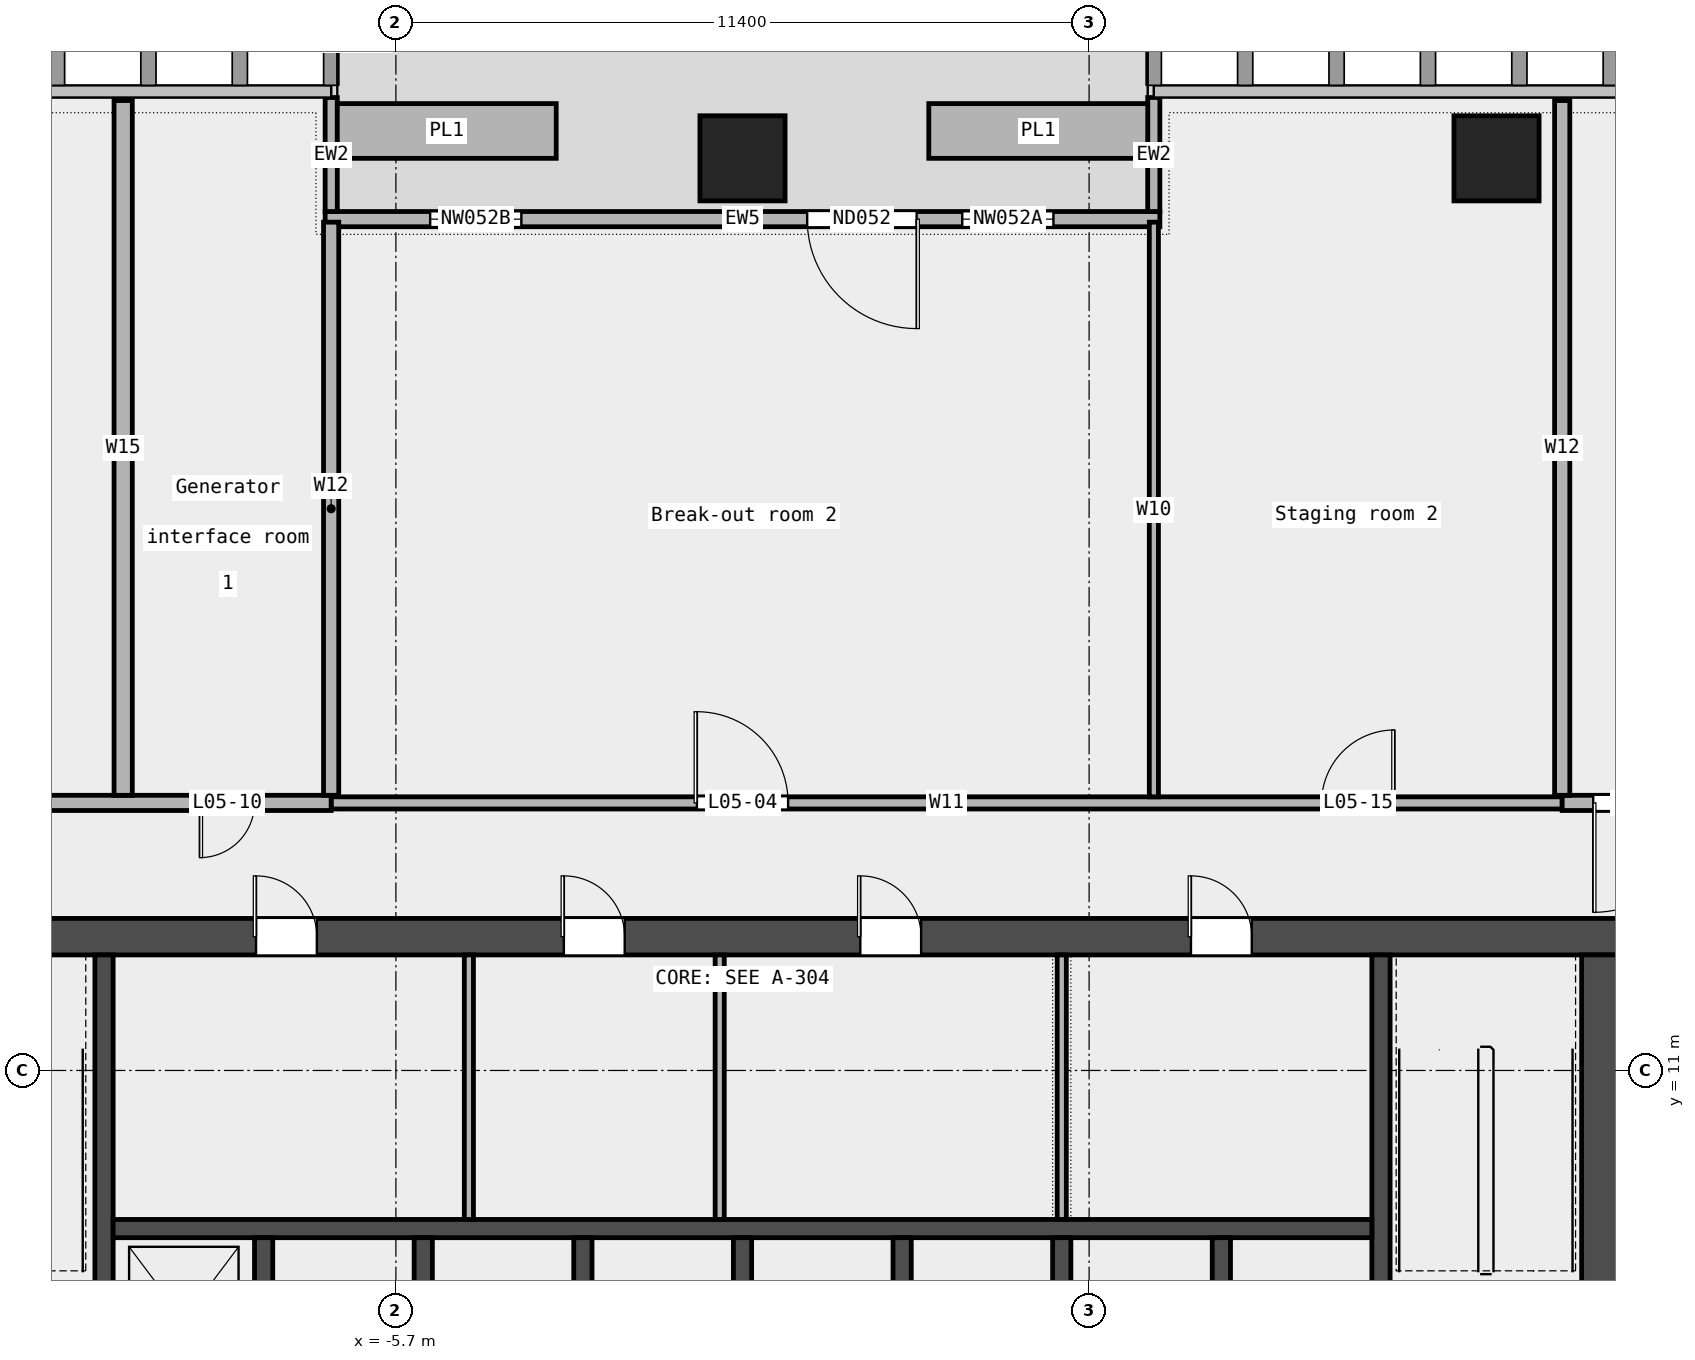
"""IFC4 building model, lengths in metres.
Left out: names, types, materials, properties, quantities, classifications, styles, units other than length and angle.
Written with IfcOpenShell. Run it as: python <this file> out.ifc"""

import sys

from ifc_helpers import new_model, si_unit, direction, frame, frame_2d, origin, origin_2d, place, context, subcontext, project, spatial, rectangle, extrude, element, fill, save


model = new_model("IFC4")
c1 = context("Model", 3, precision=1e-05, world=origin(), true_north=direction((0.0, 1.0)))
c2 = subcontext(c1, "Body", "Model", "MODEL_VIEW")
j1 = project(units=[si_unit("LENGTHUNIT", "METRE"), si_unit("PLANEANGLEUNIT", "RADIAN")], contexts=[c1])
p1 = place(None, origin())
s1 = spatial("IfcSite", under=j1, at=p1, CompositionType="ELEMENT")
p2 = place(p1, origin())
s2 = spatial("IfcBuilding", under=s1, at=p2, CompositionType="ELEMENT")
p3 = place(p2, frame((0.0, 0.0, 31.0)))
s3 = spatial("IfcBuildingStorey", under=s2, at=p3, CompositionType="ELEMENT", Elevation=31.0)
for number, where, z_axis, x_axis in (
    (1, (12.4, 26.0, 0.0), (0.0, 0.0, 1.0), (1.0, 0.0, 0.0)),
    (2, (0.0, 26.0, 0.0), (0.0, 0.0, 1.0), (1.0, 0.0, 0.0)),
):
    element("IfcColumn", number, at=place(p3, frame(where, z_axis=z_axis, x_axis=x_axis)), inside=s3, PredefinedType="COLUMN", context=c2, shape_type="SweptSolid", body=[
        extrude(rectangle(XDim=1.4, YDim=1.4, at=origin_2d()), origin(), (0.0, 0.0, 1.0), 4.35),
    ])
p4 = place(p3, frame((6.864, 25.0, 0.0), z_axis=(0.0, 0.0, 1.0), x_axis=(-1.0, 0.0, 0.0)))
e3 = element("IfcWall", 3, at=p4, inside=s3, PredefinedType="STANDARD", context=c2, shape_type="SweptSolid", body=[
    extrude(rectangle(XDim=13.727, YDim=0.25, at=frame_2d((6.864, 0.0))), origin(), (0.0, 0.0, 1.0), 4.35),
])
p5 = place(p4, frame((1.75, 0.0, 0.45)))
e4 = element("IfcOpeningElement", 4, at=p5, cuts=e3, PredefinedType="OPENING", context=c2, shape_type="SweptSolid", body=[
    extrude(rectangle(XDim=1.5, YDim=3.0, at=frame_2d((0.75, 1.5))), frame((0.0, 0.137, 0.0), z_axis=(0.0, -1.0, 0.0), x_axis=(1.0, 0.0, 0.0)), (0.0, 0.0, 1.0), 0.274),
])
p6 = place(p4, frame((4.0, 0.0, 0.0)))
e5 = element("IfcOpeningElement", 5, at=p6, cuts=e3, PredefinedType="OPENING", context=c2, shape_type="SweptSolid", body=[
    extrude(rectangle(XDim=1.8, YDim=2.4, at=frame_2d((0.9, 1.2))), frame((0.0, 0.137, 0.0), z_axis=(0.0, -1.0, 0.0), x_axis=(1.0, 0.0, 0.0)), (0.0, 0.0, 1.0), 0.274),
])
p7 = place(p4, frame((10.5, 0.0, 0.45)))
e6 = element("IfcOpeningElement", 6, at=p7, cuts=e3, PredefinedType="OPENING", context=c2, shape_type="SweptSolid", body=[
    extrude(rectangle(XDim=1.5, YDim=3.0, at=frame_2d((0.75, 1.5))), frame((0.0, 0.137, 0.0), z_axis=(0.0, -1.0, 0.0), x_axis=(1.0, 0.0, 0.0)), (0.0, 0.0, 1.0), 0.274),
])
for number, where, z_axis, x_axis in (
    (7, (6.764, 27.0, 0.0), (0.0, 0.0, 1.0), (0.0, -1.0, 0.0)),
    (8, (-6.764, 27.0, 0.0), (0.0, 0.0, 1.0), (0.0, -1.0, 0.0)),
):
    element("IfcWall", number, at=place(p3, frame(where, z_axis=z_axis, x_axis=x_axis)), inside=s3, PredefinedType="STANDARD", context=c2, shape_type="SweptSolid", body=[
        extrude(rectangle(XDim=1.875, YDim=0.2, at=frame_2d((0.938, 0.0))), origin(), (0.0, 0.0, 1.0), 4.35),
    ])
for number, where, z_axis, x_axis in (
    (9, (6.664, 26.45, 0.0), (0.0, 0.0, 1.0), (-1.0, 0.0, 0.0)),
    (10, (-3.064, 26.45, 0.0), (0.0, 0.0, 1.0), (-1.0, 0.0, 0.0)),
):
    element("IfcWall", number, at=place(p3, frame(where, z_axis=z_axis, x_axis=x_axis)), inside=s3, PredefinedType="STANDARD", context=c2, shape_type="SweptSolid", body=[
        extrude(rectangle(XDim=3.6, YDim=0.9, at=frame_2d((1.8, 0.0))), origin(), (0.0, 0.0, 1.0), 0.7),
    ])
p8 = place(p3, frame((-6.765, 15.4, 0.0), z_axis=(0.0, 0.0, 1.0), x_axis=(1.0, 0.0, 0.0)))
e11 = element("IfcWall", 11, at=p8, inside=s3, PredefinedType="PARTITIONING", context=c2, shape_type="SweptSolid", body=[
    extrude(rectangle(XDim=20.245, YDim=0.2, at=frame_2d((10.123, 0.0))), origin(), (0.0, 0.0, 1.0), 4.35),
])
p9 = place(p8, frame((6.015, 0.0, 0.0)))
e12 = element("IfcOpeningElement", 12, at=p9, cuts=e11, PredefinedType="OPENING", context=c2, shape_type="SweptSolid", body=[
    extrude(rectangle(XDim=1.5, YDim=2.1, at=frame_2d((0.75, 1.05))), frame((0.0, 0.112, 0.0), z_axis=(0.0, -1.0, 0.0), x_axis=(1.0, 0.0, 0.0)), (0.0, 0.0, 1.0), 0.224),
])
p10 = place(p8, frame((16.288, 0.0, 0.0)))
e13 = element("IfcOpeningElement", 13, at=p10, cuts=e11, PredefinedType="OPENING", context=c2, shape_type="SweptSolid", body=[
    extrude(rectangle(XDim=1.2, YDim=2.1, at=frame_2d((0.6, 1.05))), frame((0.0, 0.112, 0.0), z_axis=(0.0, -1.0, 0.0), x_axis=(1.0, 0.0, 0.0)), (0.0, 0.0, 1.0), 0.224),
])
p11 = place(p3, frame((-21.7, 15.4, 0.0), z_axis=(0.0, 0.0, 1.0), x_axis=(1.0, 0.0, 0.0)))
e14 = element("IfcWall", 14, at=p11, inside=s3, PredefinedType="PARTITIONING", context=c2, shape_type="SweptSolid", body=[
    extrude(rectangle(XDim=14.935, YDim=0.25, at=frame_2d((7.468, 0.0))), origin(), (0.0, 0.0, 1.0), 4.35),
])
p12 = place(p11, frame((12.775, 0.0, 0.0)))
e15 = element("IfcOpeningElement", 15, at=p12, cuts=e14, PredefinedType="OPENING", context=c2, shape_type="SweptSolid", body=[
    extrude(rectangle(XDim=0.9, YDim=2.1, at=frame_2d((0.45, 1.05))), frame((0.0, 0.137, 0.0), z_axis=(0.0, -1.0, 0.0), x_axis=(1.0, 0.0, 0.0)), (0.0, 0.0, 1.0), 0.274),
])
p13 = place(p11, frame((7.558, 0.0, 0.0)))
e16 = element("IfcOpeningElement", 16, at=p13, cuts=e14, PredefinedType="OPENING", context=c2, shape_type="SweptSolid", body=[
    extrude(rectangle(XDim=1.8, YDim=2.1, at=frame_2d((0.9, 1.05))), frame((0.0, 0.137, 0.0), z_axis=(0.0, -1.0, 0.0), x_axis=(1.0, 0.0, 0.0)), (0.0, 0.0, 1.0), 0.274),
])
p14 = place(p3, frame((13.48, 15.4, 0.0), z_axis=(0.0, 0.0, 1.0), x_axis=(1.0, 0.0, 0.0)))
e17 = element("IfcWall", 17, at=p14, inside=s3, PredefinedType="PARTITIONING", context=c2, shape_type="SweptSolid", body=[
    extrude(rectangle(XDim=2.82, YDim=0.25, at=frame_2d((1.41, 0.0))), origin(), (0.0, 0.0, 1.0), 4.35),
])
p15 = place(p14, frame((0.51, 0.0, 0.0)))
e18 = element("IfcOpeningElement", 18, at=p15, cuts=e17, PredefinedType="OPENING", context=c2, shape_type="SweptSolid", body=[
    extrude(rectangle(XDim=1.8, YDim=2.1, at=frame_2d((0.9, 1.05))), frame((0.0, 0.137, 0.0), z_axis=(0.0, -1.0, 0.0), x_axis=(1.0, 0.0, 0.0)), (0.0, 0.0, 1.0), 0.274),
])
p16 = place(p3, frame((-10.185, 15.525, 0.0), z_axis=(0.0, 0.0, 1.0), x_axis=(0.0, 1.0, 0.0)))
e19 = element("IfcWall", 19, at=p16, inside=s3, PredefinedType="PARTITIONING", context=c2, shape_type="SweptSolid", body=[
    extrude(rectangle(XDim=11.425, YDim=0.3, at=frame_2d((5.712, 0.0))), origin(), (0.0, 0.0, 1.0), 4.35),
])
p17 = place(p3, frame((-6.765, 15.525, 0.0), z_axis=(0.0, 0.0, 1.0), x_axis=(0.0, 1.0, 0.0)))
e20 = element("IfcWall", 20, at=p17, inside=s3, PredefinedType="PARTITIONING", context=c2, shape_type="SweptSolid", body=[
    extrude(rectangle(XDim=9.425, YDim=0.25, at=frame_2d((4.712, 0.0))), origin(), (0.0, 0.0, 1.0), 4.35),
])
p18 = place(p3, frame((6.765, 15.5, 0.0), z_axis=(0.0, 0.0, 1.0), x_axis=(0.0, 1.0, 0.0)))
e21 = element("IfcWall", 21, at=p18, inside=s3, PredefinedType="PARTITIONING", context=c2, shape_type="SweptSolid", body=[
    extrude(rectangle(XDim=9.45, YDim=0.15, at=frame_2d((4.725, 0.0))), origin(), (0.0, 0.0, 1.0), 4.35),
])
p19 = place(p3, frame((13.48, 15.525, 0.0), z_axis=(0.0, 0.0, 1.0), x_axis=(0.0, 1.0, 0.0)))
e22 = element("IfcWall", 22, at=p19, inside=s3, PredefinedType="PARTITIONING", context=c2, shape_type="SweptSolid", body=[
    extrude(rectangle(XDim=11.425, YDim=0.25, at=frame_2d((5.712, 0.0))), origin(), (0.0, 0.0, 1.0), 4.35),
])
p20 = place(p3, frame((-14.4, 13.2, 0.0), z_axis=(0.0, 0.0, 1.0), x_axis=(1.0, 0.0, 0.0)))
e23 = element("IfcWall", 23, at=p20, inside=s3, PredefinedType="SHEAR", context=c2, shape_type="SweptSolid", body=[
    extrude(rectangle(XDim=28.8, YDim=0.6, at=frame_2d((14.4, 0.0))), origin(), (0.0, 0.0, 1.0), 4.5),
])
p21 = place(p20, frame((6.4, 0.0, 0.0)))
e24 = element("IfcOpeningElement", 24, at=p21, cuts=e23, PredefinedType="OPENING", context=c2, shape_type="SweptSolid", body=[
    extrude(rectangle(XDim=1.0, YDim=2.1, at=frame_2d((0.5, 1.05))), frame((0.0, 0.312, 0.0), z_axis=(0.0, -1.0, 0.0), x_axis=(1.0, 0.0, 0.0)), (0.0, 0.0, 1.0), 0.624),
])
p22 = place(p20, frame((11.462, 0.0, 0.0)))
e25 = element("IfcOpeningElement", 25, at=p22, cuts=e23, PredefinedType="OPENING", context=c2, shape_type="SweptSolid", body=[
    extrude(rectangle(XDim=1.0, YDim=2.1, at=frame_2d((0.5, 1.05))), frame((0.0, 0.312, 0.0), z_axis=(0.0, -1.0, 0.0), x_axis=(1.0, 0.0, 0.0)), (0.0, 0.0, 1.0), 0.624),
])
p23 = place(p20, frame((16.337, 0.0, 0.0)))
e26 = element("IfcOpeningElement", 26, at=p23, cuts=e23, PredefinedType="OPENING", context=c2, shape_type="SweptSolid", body=[
    extrude(rectangle(XDim=1.0, YDim=2.1, at=frame_2d((0.5, 1.05))), frame((0.0, 0.312, 0.0), z_axis=(0.0, -1.0, 0.0), x_axis=(1.0, 0.0, 0.0)), (0.0, 0.0, 1.0), 0.624),
])
p24 = place(p20, frame((21.775, 0.0, 0.0)))
e27 = element("IfcOpeningElement", 27, at=p24, cuts=e23, PredefinedType="OPENING", context=c2, shape_type="SweptSolid", body=[
    extrude(rectangle(XDim=1.0, YDim=2.1, at=frame_2d((0.5, 1.05))), frame((0.0, 0.312, 0.0), z_axis=(0.0, -1.0, 0.0), x_axis=(1.0, 0.0, 0.0)), (0.0, 0.0, 1.0), 0.624),
])
p25 = place(p3, frame((14.1, -6.6, 0.0), z_axis=(0.0, 0.0, 1.0), x_axis=(0.0, 1.0, 0.0)))
e28 = element("IfcWall", 28, at=p25, inside=s3, PredefinedType="SHEAR", context=c2, shape_type="SweptSolid", body=[
    extrude(rectangle(XDim=19.5, YDim=0.6, at=frame_2d((9.75, 0.0))), origin(), (0.0, 0.0, 1.0), 4.5),
])
p26 = place(p25, frame((9.3, 0.0, 0.0)))
e29 = element("IfcOpeningElement", 29, at=p26, cuts=e28, PredefinedType="OPENING", context=c2, shape_type="SweptSolid", body=[
    extrude(rectangle(XDim=1.8, YDim=2.1, at=frame_2d((0.9, 1.05))), frame((0.0, 0.312, 0.0), z_axis=(0.0, -1.0, 0.0), x_axis=(1.0, 0.0, 0.0)), (0.0, 0.0, 1.0), 0.624),
])
for number, where, z_axis, x_axis in (
    (30, (-10.5, 5.25, 0.0), (0.0, 0.0, 1.0), (0.0, 1.0, 0.0)),
    (31, (10.5, 5.25, 0.0), (0.0, 0.0, 1.0), (0.0, 1.0, 0.0)),
):
    element("IfcWall", number, at=place(p3, frame(where, z_axis=z_axis, x_axis=x_axis)), inside=s3, PredefinedType="SHEAR", context=c2, shape_type="SweptSolid", body=[
        extrude(rectangle(XDim=7.65, YDim=0.3, at=frame_2d((3.825, 0.0))), origin(), (0.0, 0.0, 1.0), 4.5),
    ])
p27 = place(p3, frame((-10.35, 8.4, 0.0), z_axis=(0.0, 0.0, 1.0), x_axis=(1.0, 0.0, 0.0)))
e32 = element("IfcWall", 32, at=p27, inside=s3, PredefinedType="SOLIDWALL", context=c2, shape_type="SweptSolid", body=[
    extrude(rectangle(XDim=20.7, YDim=0.3, at=frame_2d((10.35, 0.0))), origin(), (0.0, 0.0, 1.0), 4.5),
])
for number, where, z_axis, x_axis in (
    (33, (-7.875, 5.55, 0.0), (0.0, 0.0, 1.0), (0.0, 1.0, 0.0)),
    (34, (-5.25, 5.55, 0.0), (0.0, 0.0, 1.0), (0.0, 1.0, 0.0)),
    (35, (-2.625, 5.55, 0.0), (0.0, 0.0, 1.0), (0.0, 1.0, 0.0)),
    (36, (0.0, 5.55, 0.0), (0.0, 0.0, 1.0), (0.0, 1.0, 0.0)),
    (37, (2.625, 5.55, 0.0), (0.0, 0.0, 1.0), (0.0, 1.0, 0.0)),
    (38, (5.25, 5.55, 0.0), (0.0, 0.0, 1.0), (0.0, 1.0, 0.0)),
    (39, (7.875, 5.55, 0.0), (0.0, 0.0, 1.0), (0.0, 1.0, 0.0)),
):
    element("IfcWall", number, at=place(p3, frame(where, z_axis=z_axis, x_axis=x_axis)), inside=s3, PredefinedType="SOLIDWALL", context=c2, shape_type="SweptSolid", body=[
        extrude(rectangle(XDim=2.7, YDim=0.3, at=frame_2d((1.35, 0.0))), origin(), (0.0, 0.0, 1.0), 4.5),
    ])
for number, where, z_axis, x_axis in (
    (40, (-4.5, 8.55, 0.0), (0.0, 0.0, 1.0), (0.0, 1.0, 0.0)),
    (41, (-0.375, 8.55, 0.0), (0.0, 0.0, 1.0), (0.0, 1.0, 0.0)),
    (42, (5.25, 8.55, 0.0), (0.0, 0.0, 1.0), (0.0, 1.0, 0.0)),
):
    element("IfcWall", number, at=place(p3, frame(where, z_axis=z_axis, x_axis=x_axis)), inside=s3, PredefinedType="PARTITIONING", context=c2, shape_type="SweptSolid", body=[
        extrude(rectangle(XDim=4.35, YDim=0.15, at=frame_2d((2.175, 0.0))), origin(), (0.0, 0.0, 1.0), 4.5),
    ])
p28 = place(p5, origin())
e43 = element("IfcWindow", 43, at=p28, inside=s3, PartitioningType="SINGLE_PANEL", PredefinedType="WINDOW", context=c2, shape_type="SweptSolid", body=[
    extrude(rectangle(XDim=1.5, YDim=3.0, at=frame_2d((0.75, 1.5))), frame((0.0, 0.03, 0.0), z_axis=(0.0, -1.0, 0.0), x_axis=(1.0, 0.0, 0.0)), (0.0, 0.0, 1.0), 0.06),
])
fill(e4, e43)
p29 = place(p6, origin())
e44 = element("IfcDoor", 44, at=p29, inside=s3, OperationType="DOUBLE_DOOR_SINGLE_SWING", PredefinedType="DOOR", context=c2, shape_type="SweptSolid", body=[
    extrude(rectangle(XDim=1.8, YDim=2.4, at=frame_2d((0.9, 1.2))), frame((0.0, 0.025, 0.0), z_axis=(0.0, -1.0, 0.0), x_axis=(1.0, 0.0, 0.0)), (0.0, 0.0, 1.0), 0.05),
])
fill(e5, e44)
p30 = place(p7, origin())
e45 = element("IfcWindow", 45, at=p30, inside=s3, PartitioningType="SINGLE_PANEL", PredefinedType="WINDOW", context=c2, shape_type="SweptSolid", body=[
    extrude(rectangle(XDim=1.5, YDim=3.0, at=frame_2d((0.75, 1.5))), frame((0.0, 0.03, 0.0), z_axis=(0.0, -1.0, 0.0), x_axis=(1.0, 0.0, 0.0)), (0.0, 0.0, 1.0), 0.06),
])
fill(e6, e45)
p31 = place(p9, origin())
e46 = element("IfcDoor", 46, at=p31, inside=s3, OperationType="DOUBLE_DOOR_SINGLE_SWING", PredefinedType="DOOR", context=c2, shape_type="SweptSolid", body=[
    extrude(rectangle(XDim=1.5, YDim=2.1, at=frame_2d((0.75, 1.05))), frame((0.0, 0.025, 0.0), z_axis=(0.0, -1.0, 0.0), x_axis=(1.0, 0.0, 0.0)), (0.0, 0.0, 1.0), 0.05),
])
fill(e12, e46)
p32 = place(p12, origin())
e47 = element("IfcDoor", 47, at=p32, inside=s3, OperationType="SINGLE_SWING_RIGHT", PredefinedType="DOOR", context=c2, shape_type="SweptSolid", body=[
    extrude(rectangle(XDim=0.9, YDim=2.1, at=frame_2d((0.45, 1.05))), frame((0.0, 0.025, 0.0), z_axis=(0.0, -1.0, 0.0), x_axis=(1.0, 0.0, 0.0)), (0.0, 0.0, 1.0), 0.05),
])
fill(e15, e47)
p33 = place(p15, origin())
e48 = element("IfcDoor", 48, at=p33, inside=s3, OperationType="DOUBLE_DOOR_SINGLE_SWING", PredefinedType="DOOR", context=c2, shape_type="SweptSolid", body=[
    extrude(rectangle(XDim=1.8, YDim=2.1, at=frame_2d((0.9, 1.05))), frame((0.0, 0.025, 0.0), z_axis=(0.0, -1.0, 0.0), x_axis=(1.0, 0.0, 0.0)), (0.0, 0.0, 1.0), 0.05),
])
fill(e18, e48)
p34 = place(p10, origin())
e49 = element("IfcDoor", 49, at=p34, inside=s3, OperationType="SINGLE_SWING_RIGHT", PredefinedType="DOOR", context=c2, shape_type="SweptSolid", body=[
    extrude(rectangle(XDim=1.2, YDim=2.1, at=frame_2d((0.6, 1.05))), frame((0.0, 0.025, 0.0), z_axis=(0.0, -1.0, 0.0), x_axis=(1.0, 0.0, 0.0)), (0.0, 0.0, 1.0), 0.05),
])
fill(e13, e49)
p35 = place(p21, origin())
e50 = element("IfcDoor", 50, at=p35, inside=s3, OperationType="SINGLE_SWING_LEFT", PredefinedType="DOOR", context=c2, shape_type="SweptSolid", body=[
    extrude(rectangle(XDim=1.0, YDim=2.1, at=frame_2d((0.5, 1.05))), frame((0.0, 0.025, 0.0), z_axis=(0.0, -1.0, 0.0), x_axis=(1.0, 0.0, 0.0)), (0.0, 0.0, 1.0), 0.05),
])
fill(e24, e50)
p36 = place(p22, origin())
e51 = element("IfcDoor", 51, at=p36, inside=s3, OperationType="SINGLE_SWING_LEFT", PredefinedType="DOOR", context=c2, shape_type="SweptSolid", body=[
    extrude(rectangle(XDim=1.0, YDim=2.1, at=frame_2d((0.5, 1.05))), frame((0.0, 0.025, 0.0), z_axis=(0.0, -1.0, 0.0), x_axis=(1.0, 0.0, 0.0)), (0.0, 0.0, 1.0), 0.05),
])
fill(e25, e51)
p37 = place(p23, origin())
e52 = element("IfcDoor", 52, at=p37, inside=s3, OperationType="SINGLE_SWING_LEFT", PredefinedType="DOOR", context=c2, shape_type="SweptSolid", body=[
    extrude(rectangle(XDim=1.0, YDim=2.1, at=frame_2d((0.5, 1.05))), frame((0.0, 0.025, 0.0), z_axis=(0.0, -1.0, 0.0), x_axis=(1.0, 0.0, 0.0)), (0.0, 0.0, 1.0), 0.05),
])
fill(e26, e52)
p38 = place(p24, origin())
e53 = element("IfcDoor", 53, at=p38, inside=s3, OperationType="SINGLE_SWING_LEFT", PredefinedType="DOOR", context=c2, shape_type="SweptSolid", body=[
    extrude(rectangle(XDim=1.0, YDim=2.1, at=frame_2d((0.5, 1.05))), frame((0.0, 0.025, 0.0), z_axis=(0.0, -1.0, 0.0), x_axis=(1.0, 0.0, 0.0)), (0.0, 0.0, 1.0), 0.05),
])
fill(e27, e53)
save(model, sys.argv[1])
